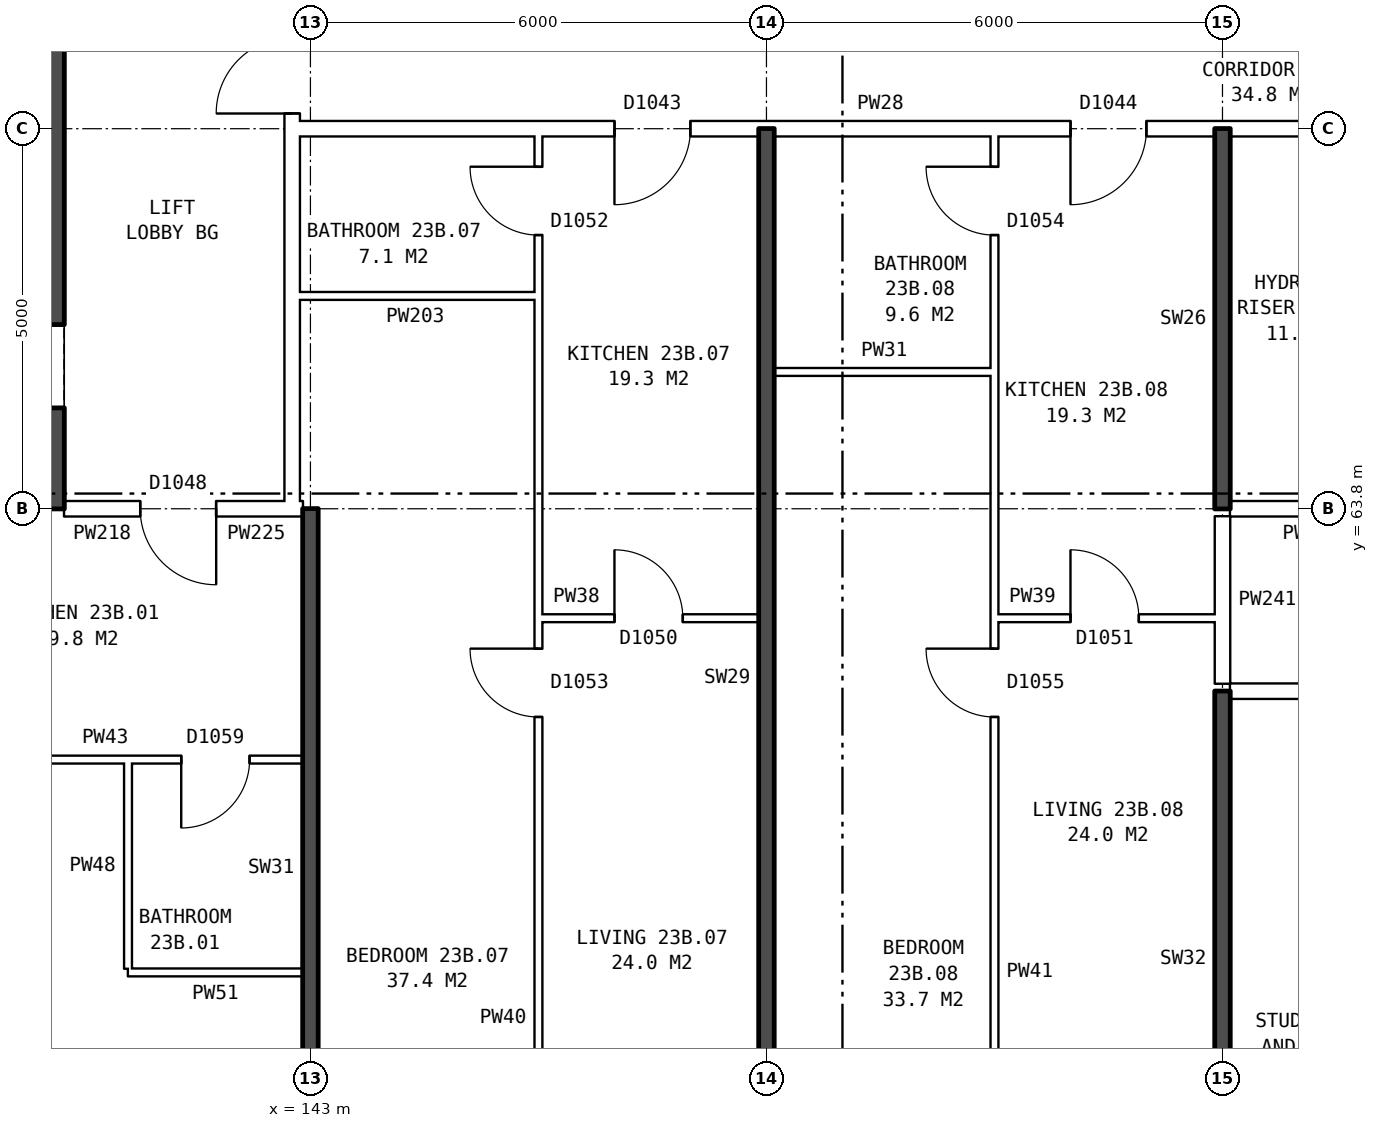
"""IFC4 building model, lengths in metres.
Left out: names, types, materials, properties, quantities, classifications, styles, units other than length and angle.
Written with IfcOpenShell. Run it as: python <this file> out.ifc"""

import sys

from ifc_helpers import new_model, si_unit, direction, frame, frame_2d, origin, place, context, subcontext, project, spatial, rectangle, extrude, element, fill, save


model = new_model("IFC4")
c1 = context("Model", 3, precision=1e-05, world=origin(), true_north=direction((0.0, 1.0)))
c2 = subcontext(c1, "Body", "Model", "MODEL_VIEW")
j1 = project(units=[si_unit("LENGTHUNIT", "METRE"), si_unit("PLANEANGLEUNIT", "RADIAN")], contexts=[c1])
p1 = place(None, origin())
s1 = spatial("IfcSite", under=j1, at=p1, CompositionType="ELEMENT")
p2 = place(p1, origin())
s2 = spatial("IfcBuilding", under=s1, at=p2, CompositionType="ELEMENT")
p3 = place(p2, frame((0.0, 0.0, 84.0)))
s3 = spatial("IfcBuildingStorey", under=s2, at=p3, CompositionType="ELEMENT", Elevation=84.0)
p4 = place(p3, frame((139.41, 64.5, 0.0), z_axis=(0.0, 0.0, 1.0), x_axis=(0.0, 1.0, 0.0)))
e1 = element("IfcWall", 1, at=p4, inside=s3, PredefinedType="SHEAR", context=c2, shape_type="SweptSolid", body=[
    extrude(rectangle(XDim=11.0, YDim=0.7, at=frame_2d((5.5, 0.0))), origin(), (0.0, 0.0, 1.0), 2.85),
])
p5 = place(p4, frame((0.625, 0.0, 0.0)))
e2 = element("IfcOpeningElement", 2, at=p5, cuts=e1, PredefinedType="OPENING", context=c2, shape_type="SweptSolid", body=[
    extrude(rectangle(XDim=1.1, YDim=2.1, at=frame_2d((0.55, 1.05))), frame((0.0, 0.36, 0.0), z_axis=(0.0, -1.0, 0.0), x_axis=(1.0, 0.0, 0.0)), (0.0, 0.0, 1.0), 0.72),
])
p6 = place(p4, frame((9.2, 0.0, 0.0)))
e3 = element("IfcOpeningElement", 3, at=p6, cuts=e1, PredefinedType="OPENING", context=c2, shape_type="SweptSolid", body=[
    extrude(rectangle(XDim=1.1, YDim=2.1, at=frame_2d((0.55, 1.05))), frame((0.0, 0.36, 0.0), z_axis=(0.0, -1.0, 0.0), x_axis=(1.0, 0.0, 0.0)), (0.0, 0.0, 1.0), 0.72),
])
p7 = place(p4, frame((7.425, 0.0, 0.0)))
e4 = element("IfcOpeningElement", 4, at=p7, cuts=e1, PredefinedType="OPENING", context=c2, shape_type="SweptSolid", body=[
    extrude(rectangle(XDim=0.85, YDim=2.1, at=frame_2d((0.425, 1.05))), frame((0.0, 0.36, 0.0), z_axis=(0.0, -1.0, 0.0), x_axis=(1.0, 0.0, 0.0)), (0.0, 0.0, 1.0), 0.72),
])
p8 = place(p3, frame((139.76, 64.15, 0.0), z_axis=(0.0, 0.0, 1.0), x_axis=(-1.0, 0.0, 0.0)))
e5 = element("IfcWall", 5, at=p8, inside=s3, PredefinedType="SHEAR", context=c2, shape_type="SweptSolid", body=[
    extrude(rectangle(XDim=8.4, YDim=0.7, at=frame_2d((4.2, 0.0))), origin(), (0.0, 0.0, 1.0), 2.85),
])
p9 = place(p3, frame((142.76, 63.9, 0.0), z_axis=(0.0, 0.0, 1.0), x_axis=(0.0, 1.0, 0.0)))
e6 = element("IfcWall", 6, at=p9, inside=s3, PredefinedType="PARTITIONING", context=c2, shape_type="SweptSolid", body=[
    extrude(rectangle(XDim=12.2, YDim=0.2, at=frame_2d((6.1, 0.0))), origin(), (0.0, 0.0, 1.0), 2.85),
])
p10 = place(p9, frame((5.1, 0.0, 0.0)))
e7 = element("IfcOpeningElement", 7, at=p10, cuts=e6, PredefinedType="OPENING", context=c2, shape_type="SweptSolid", body=[
    extrude(rectangle(XDim=2.0, YDim=2.1, at=frame_2d((1.0, 1.05))), frame((0.0, 0.11, 0.0), z_axis=(0.0, -1.0, 0.0), x_axis=(1.0, 0.0, 0.0)), (0.0, 0.0, 1.0), 0.22),
])
p11 = place(p3, frame((140.6, 57.7, 0.0), z_axis=(0.0, 0.0, 1.0), x_axis=(1.0, 0.0, 0.0)))
e8 = element("IfcWall", 8, at=p11, inside=s3, PredefinedType="PARTITIONING", context=c2, shape_type="SweptSolid", body=[
    extrude(rectangle(XDim=2.3, YDim=0.1, at=frame_2d((1.15, 0.0))), origin(), (0.0, 0.0, 1.0), 2.85),
])
p12 = place(p3, frame((137.1, 60.5, 0.0), z_axis=(0.0, 0.0, 1.0), x_axis=(1.0, 0.0, 0.0)))
e9 = element("IfcWall", 9, at=p12, inside=s3, PredefinedType="PARTITIONING", context=c2, shape_type="SweptSolid", body=[
    extrude(rectangle(XDim=5.8, YDim=0.1, at=frame_2d((2.9, 0.0))), origin(), (0.0, 0.0, 1.0), 2.85),
])
p13 = place(p12, frame((1.3, 0.0, 0.0)))
e10 = element("IfcOpeningElement", 10, at=p13, cuts=e9, PredefinedType="OPENING", context=c2, shape_type="SweptSolid", body=[
    extrude(rectangle(XDim=0.9, YDim=2.1, at=frame_2d((0.45, 1.05))), frame((0.0, 0.06, 0.0), z_axis=(0.0, -1.0, 0.0), x_axis=(1.0, 0.0, 0.0)), (0.0, 0.0, 1.0), 0.12),
])
p14 = place(p12, frame((4.2, 0.0, 0.0)))
e11 = element("IfcOpeningElement", 11, at=p14, cuts=e9, PredefinedType="OPENING", context=c2, shape_type="SweptSolid", body=[
    extrude(rectangle(XDim=0.9, YDim=2.1, at=frame_2d((0.45, 1.05))), frame((0.0, 0.06, 0.0), z_axis=(0.0, -1.0, 0.0), x_axis=(1.0, 0.0, 0.0)), (0.0, 0.0, 1.0), 0.12),
])
p15 = place(p3, frame((155.1, 61.4, 0.0), z_axis=(0.0, 0.0, 1.0), x_axis=(1.0, 0.0, 0.0)))
e12 = element("IfcWall", 12, at=p15, inside=s3, PredefinedType="PARTITIONING", context=c2, shape_type="SweptSolid", body=[
    extrude(rectangle(XDim=19.79, YDim=0.2, at=frame_2d((9.895, 0.0))), origin(), (0.0, 0.0, 1.0), 2.85),
])
p16 = place(p15, frame((1.45, 0.0, 0.0)))
e13 = element("IfcOpeningElement", 13, at=p16, cuts=e12, PredefinedType="OPENING", context=c2, shape_type="SweptSolid", body=[
    extrude(rectangle(XDim=1.0, YDim=2.1, at=frame_2d((0.5, 1.05))), frame((0.0, 0.11, 0.0), z_axis=(0.0, -1.0, 0.0), x_axis=(1.0, 0.0, 0.0)), (0.0, 0.0, 1.0), 0.22),
])
p17 = place(p15, frame((7.4, 0.0, 0.0)))
e14 = element("IfcOpeningElement", 14, at=p17, cuts=e12, PredefinedType="OPENING", context=c2, shape_type="SweptSolid", body=[
    extrude(rectangle(XDim=1.0, YDim=2.1, at=frame_2d((0.5, 1.05))), frame((0.0, 0.11, 0.0), z_axis=(0.0, -1.0, 0.0), x_axis=(1.0, 0.0, 0.0)), (0.0, 0.0, 1.0), 0.22),
])
p18 = place(p15, frame((13.2, 0.0, 0.0)))
e15 = element("IfcOpeningElement", 15, at=p18, cuts=e12, PredefinedType="OPENING", context=c2, shape_type="SweptSolid", body=[
    extrude(rectangle(XDim=1.0, YDim=2.1, at=frame_2d((0.5, 1.05))), frame((0.0, 0.11, 0.0), z_axis=(0.0, -1.0, 0.0), x_axis=(1.0, 0.0, 0.0)), (0.0, 0.0, 1.0), 0.22),
])
p19 = place(p3, frame((146.0, 62.36, 0.0), z_axis=(0.0, 0.0, 1.0), x_axis=(1.0, 0.0, 0.0)))
e16 = element("IfcWall", 16, at=p19, inside=s3, PredefinedType="PARTITIONING", context=c2, shape_type="SweptSolid", body=[
    extrude(rectangle(XDim=2.9, YDim=0.1, at=frame_2d((1.45, 0.0))), origin(), (0.0, 0.0, 1.0), 2.85),
])
p20 = place(p19, frame((1.0, 0.0, 0.0)))
e17 = element("IfcOpeningElement", 17, at=p20, cuts=e16, PredefinedType="OPENING", context=c2, shape_type="SweptSolid", body=[
    extrude(rectangle(XDim=0.9, YDim=2.1, at=frame_2d((0.45, 1.05))), frame((0.0, 0.06, 0.0), z_axis=(0.0, -1.0, 0.0), x_axis=(1.0, 0.0, 0.0)), (0.0, 0.0, 1.0), 0.12),
])
p21 = place(p3, frame((152.0, 62.36, 0.0), z_axis=(0.0, 0.0, 1.0), x_axis=(1.0, 0.0, 0.0)))
e18 = element("IfcWall", 18, at=p21, inside=s3, PredefinedType="PARTITIONING", context=c2, shape_type="SweptSolid", body=[
    extrude(rectangle(XDim=2.9, YDim=0.1, at=frame_2d((1.45, 0.0))), origin(), (0.0, 0.0, 1.0), 2.85),
])
p22 = place(p21, frame((1.0, 0.0, 0.0)))
e19 = element("IfcOpeningElement", 19, at=p22, cuts=e18, PredefinedType="OPENING", context=c2, shape_type="SweptSolid", body=[
    extrude(rectangle(XDim=0.9, YDim=2.1, at=frame_2d((0.45, 1.05))), frame((0.0, 0.06, 0.0), z_axis=(0.0, -1.0, 0.0), x_axis=(1.0, 0.0, 0.0)), (0.0, 0.0, 1.0), 0.12),
])
p23 = place(p3, frame((139.76, 63.8, 0.0), z_axis=(0.0, 0.0, 1.0), x_axis=(1.0, 0.0, 0.0)))
e20 = element("IfcWall", 20, at=p23, inside=s3, PredefinedType="PARTITIONING", context=c2, shape_type="SweptSolid", body=[
    extrude(rectangle(XDim=3.0, YDim=0.2, at=frame_2d((1.5, 0.0))), origin(), (0.0, 0.0, 1.0), 2.85),
])
p24 = place(p23, frame((1.0, 0.0, 0.0)))
e21 = element("IfcOpeningElement", 21, at=p24, cuts=e20, PredefinedType="OPENING", context=c2, shape_type="SweptSolid", body=[
    extrude(rectangle(XDim=1.0, YDim=2.1, at=frame_2d((0.5, 1.05))), frame((0.0, 0.11, 0.0), z_axis=(0.0, -1.0, 0.0), x_axis=(1.0, 0.0, 0.0)), (0.0, 0.0, 1.0), 0.22),
])
p25 = place(p3, frame((142.76, 63.8, 0.0), z_axis=(0.0, 0.0, 1.0), x_axis=(1.0, 0.0, 0.0)))
e22 = element("IfcWall", 22, at=p25, inside=s3, PredefinedType="PARTITIONING", context=c2, shape_type="SweptSolid", body=[
    extrude(rectangle(XDim=0.14, YDim=0.2, at=frame_2d((0.07, 0.0))), origin(), (0.0, 0.0, 1.0), 2.85),
])
p26 = place(p3, frame((155.1, 63.8, 0.0), z_axis=(0.0, 0.0, 1.0), x_axis=(1.0, 0.0, 0.0)))
e23 = element("IfcWall", 23, at=p26, inside=s3, PredefinedType="PARTITIONING", context=c2, shape_type="SweptSolid", body=[
    extrude(rectangle(XDim=2.14, YDim=0.2, at=frame_2d((1.07, 0.0))), origin(), (0.0, 0.0, 1.0), 2.85),
])
p27 = place(p3, frame((149.1, 65.6, 0.0), z_axis=(0.0, 0.0, 1.0), x_axis=(1.0, 0.0, 0.0)))
e24 = element("IfcWall", 24, at=p27, inside=s3, PredefinedType="PARTITIONING", context=c2, shape_type="SweptSolid", body=[
    extrude(rectangle(XDim=2.9, YDim=0.1, at=frame_2d((1.45, 0.0))), origin(), (0.0, 0.0, 1.0), 2.85),
])
p28 = place(p3, frame((142.76, 66.6, 0.0), z_axis=(0.0, 0.0, 1.0), x_axis=(1.0, 0.0, 0.0)))
e25 = element("IfcWall", 25, at=p28, inside=s3, PredefinedType="PARTITIONING", context=c2, shape_type="SweptSolid", body=[
    extrude(rectangle(XDim=3.24, YDim=0.1, at=frame_2d((1.62, 0.0))), origin(), (0.0, 0.0, 1.0), 2.85),
])
p29 = place(p3, frame((142.76, 68.8, 0.0), z_axis=(0.0, 0.0, 1.0), x_axis=(1.0, 0.0, 0.0)))
e26 = element("IfcWall", 26, at=p29, inside=s3, PredefinedType="PARTITIONING", context=c2, shape_type="SweptSolid", body=[
    extrude(rectangle(XDim=14.48, YDim=0.2, at=frame_2d((7.24, 0.0))), origin(), (0.0, 0.0, 1.0), 2.85),
])
p30 = place(p29, frame((4.24, 0.0, 0.0)))
e27 = element("IfcOpeningElement", 27, at=p30, cuts=e26, PredefinedType="OPENING", context=c2, shape_type="SweptSolid", body=[
    extrude(rectangle(XDim=1.0, YDim=2.1, at=frame_2d((0.5, 1.05))), frame((0.0, 0.11, 0.0), z_axis=(0.0, -1.0, 0.0), x_axis=(1.0, 0.0, 0.0)), (0.0, 0.0, 1.0), 0.22),
])
p31 = place(p29, frame((10.24, 0.0, 0.0)))
e28 = element("IfcOpeningElement", 28, at=p31, cuts=e26, PredefinedType="OPENING", context=c2, shape_type="SweptSolid", body=[
    extrude(rectangle(XDim=1.0, YDim=2.1, at=frame_2d((0.5, 1.05))), frame((0.0, 0.11, 0.0), z_axis=(0.0, -1.0, 0.0), x_axis=(1.0, 0.0, 0.0)), (0.0, 0.0, 1.0), 0.22),
])
p32 = place(p3, frame((140.6, 57.75, 0.0), z_axis=(0.0, 0.0, 1.0), x_axis=(0.0, 1.0, 0.0)))
e29 = element("IfcWall", 29, at=p32, inside=s3, PredefinedType="PARTITIONING", context=c2, shape_type="SweptSolid", body=[
    extrude(rectangle(XDim=2.7, YDim=0.1, at=frame_2d((1.35, 0.0))), origin(), (0.0, 0.0, 1.0), 2.85),
])
p33 = place(p3, frame((143.0, 54.36, 0.0), z_axis=(0.0, 0.0, 1.0), x_axis=(0.0, 1.0, 0.0)))
e30 = element("IfcWall", 30, at=p33, inside=s3, PredefinedType="SOLIDWALL", context=c2, shape_type="SweptSolid", body=[
    extrude(rectangle(XDim=9.44, YDim=0.2, at=frame_2d((4.72, 0.0))), origin(), (0.0, 0.0, 1.0), 2.85),
])
p34 = place(p3, frame((146.0, 54.36, 0.0), z_axis=(0.0, 0.0, 1.0), x_axis=(0.0, 1.0, 0.0)))
e31 = element("IfcWall", 31, at=p34, inside=s3, PredefinedType="PARTITIONING", context=c2, shape_type="SweptSolid", body=[
    extrude(rectangle(XDim=14.34, YDim=0.1, at=frame_2d((7.17, 0.0))), origin(), (0.0, 0.0, 1.0), 2.85),
])
p35 = place(p34, frame((6.7, 0.0, 0.0)))
e32 = element("IfcOpeningElement", 32, at=p35, cuts=e31, PredefinedType="OPENING", context=c2, shape_type="SweptSolid", body=[
    extrude(rectangle(XDim=0.9, YDim=2.1, at=frame_2d((0.45, 1.05))), frame((0.0, 0.06, 0.0), z_axis=(0.0, -1.0, 0.0), x_axis=(1.0, 0.0, 0.0)), (0.0, 0.0, 1.0), 0.12),
])
p36 = place(p34, frame((13.04, 0.0, 0.0)))
e33 = element("IfcOpeningElement", 33, at=p36, cuts=e31, PredefinedType="OPENING", context=c2, shape_type="SweptSolid", body=[
    extrude(rectangle(XDim=0.9, YDim=2.1, at=frame_2d((0.45, 1.05))), frame((0.0, 0.06, 0.0), z_axis=(0.0, -1.0, 0.0), x_axis=(1.0, 0.0, 0.0)), (0.0, 0.0, 1.0), 0.12),
])
p37 = place(p3, frame((149.0, 54.36, 0.0), z_axis=(0.0, 0.0, 1.0), x_axis=(0.0, 1.0, 0.0)))
e34 = element("IfcWall", 34, at=p37, inside=s3, PredefinedType="SOLIDWALL", context=c2, shape_type="SweptSolid", body=[
    extrude(rectangle(XDim=14.44, YDim=0.2, at=frame_2d((7.22, 0.0))), origin(), (0.0, 0.0, 1.0), 2.85),
])
p38 = place(p3, frame((152.0, 54.36, 0.0), z_axis=(0.0, 0.0, 1.0), x_axis=(0.0, 1.0, 0.0)))
e35 = element("IfcWall", 35, at=p38, inside=s3, PredefinedType="PARTITIONING", context=c2, shape_type="SweptSolid", body=[
    extrude(rectangle(XDim=14.34, YDim=0.1, at=frame_2d((7.17, 0.0))), origin(), (0.0, 0.0, 1.0), 2.85),
])
p39 = place(p38, frame((6.7, 0.0, 0.0)))
e36 = element("IfcOpeningElement", 36, at=p39, cuts=e35, PredefinedType="OPENING", context=c2, shape_type="SweptSolid", body=[
    extrude(rectangle(XDim=0.9, YDim=2.1, at=frame_2d((0.45, 1.05))), frame((0.0, 0.06, 0.0), z_axis=(0.0, -1.0, 0.0), x_axis=(1.0, 0.0, 0.0)), (0.0, 0.0, 1.0), 0.12),
])
p40 = place(p38, frame((13.04, 0.0, 0.0)))
e37 = element("IfcOpeningElement", 37, at=p40, cuts=e35, PredefinedType="OPENING", context=c2, shape_type="SweptSolid", body=[
    extrude(rectangle(XDim=0.9, YDim=2.1, at=frame_2d((0.45, 1.05))), frame((0.0, 0.06, 0.0), z_axis=(0.0, -1.0, 0.0), x_axis=(1.0, 0.0, 0.0)), (0.0, 0.0, 1.0), 0.12),
])
p41 = place(p3, frame((155.0, 54.36, 0.0), z_axis=(0.0, 0.0, 1.0), x_axis=(0.0, 1.0, 0.0)))
e38 = element("IfcWall", 38, at=p41, inside=s3, PredefinedType="SOLIDWALL", context=c2, shape_type="SweptSolid", body=[
    extrude(rectangle(XDim=7.04, YDim=0.2, at=frame_2d((3.52, 0.0))), origin(), (0.0, 0.0, 1.0), 2.85),
])
p42 = place(p3, frame((155.0, 61.5, 0.0), z_axis=(0.0, 0.0, 1.0), x_axis=(0.0, 1.0, 0.0)))
e39 = element("IfcWall", 39, at=p42, inside=s3, PredefinedType="PARTITIONING", context=c2, shape_type="SweptSolid", body=[
    extrude(rectangle(XDim=2.2, YDim=0.2, at=frame_2d((1.1, 0.0))), origin(), (0.0, 0.0, 1.0), 2.85),
])
p43 = place(p3, frame((155.0, 63.8, 0.0), z_axis=(0.0, 0.0, 1.0), x_axis=(0.0, 1.0, 0.0)))
e40 = element("IfcWall", 40, at=p43, inside=s3, PredefinedType="SOLIDWALL", context=c2, shape_type="SweptSolid", body=[
    extrude(rectangle(XDim=5.0, YDim=0.2, at=frame_2d((2.5, 0.0))), origin(), (0.0, 0.0, 1.0), 2.85),
])
p44 = place(p10, origin())
e41 = element("IfcDoor", 41, at=p44, inside=s3, OperationType="DOUBLE_DOOR_SINGLE_SWING", PredefinedType="DOOR", context=c2, shape_type="SweptSolid", body=[
    extrude(rectangle(XDim=2.0, YDim=2.1, at=frame_2d((1.0, 1.05))), frame((0.0, 0.025, 0.0), z_axis=(0.0, -1.0, 0.0), x_axis=(1.0, 0.0, 0.0)), (0.0, 0.0, 1.0), 0.05),
])
fill(e7, e41)
p45 = place(p24, frame((1.0, 0.0, 0.0), z_axis=(0.0, 0.0, 1.0), x_axis=(-1.0, 0.0, 0.0)))
e42 = element("IfcDoor", 42, at=p45, inside=s3, OperationType="SINGLE_SWING_LEFT", PredefinedType="DOOR", context=c2, shape_type="SweptSolid", body=[
    extrude(rectangle(XDim=1.0, YDim=2.1, at=frame_2d((0.5, 1.05))), frame((0.0, 0.025, 0.0), z_axis=(0.0, -1.0, 0.0), x_axis=(1.0, 0.0, 0.0)), (0.0, 0.0, 1.0), 0.05),
])
fill(e21, e42)
p46 = place(p14, frame((0.9, 0.0, 0.0), z_axis=(0.0, 0.0, 1.0), x_axis=(-1.0, 0.0, 0.0)))
e43 = element("IfcDoor", 43, at=p46, inside=s3, OperationType="SINGLE_SWING_RIGHT", PredefinedType="DOOR", context=c2, shape_type="SweptSolid", body=[
    extrude(rectangle(XDim=0.9, YDim=2.1, at=frame_2d((0.45, 1.05))), frame((0.0, 0.025, 0.0), z_axis=(0.0, -1.0, 0.0), x_axis=(1.0, 0.0, 0.0)), (0.0, 0.0, 1.0), 0.05),
])
fill(e11, e43)
p47 = place(p35, origin())
e44 = element("IfcDoor", 44, at=p47, inside=s3, OperationType="SINGLE_SWING_RIGHT", PredefinedType="DOOR", context=c2, shape_type="SweptSolid", body=[
    extrude(rectangle(XDim=0.9, YDim=2.1, at=frame_2d((0.45, 1.05))), frame((0.0, 0.025, 0.0), z_axis=(0.0, -1.0, 0.0), x_axis=(1.0, 0.0, 0.0)), (0.0, 0.0, 1.0), 0.05),
])
fill(e32, e44)
p48 = place(p30, frame((1.0, 0.0, 0.0), z_axis=(0.0, 0.0, 1.0), x_axis=(-1.0, 0.0, 0.0)))
e45 = element("IfcDoor", 45, at=p48, inside=s3, OperationType="SINGLE_SWING_RIGHT", PredefinedType="DOOR", context=c2, shape_type="SweptSolid", body=[
    extrude(rectangle(XDim=1.0, YDim=2.1, at=frame_2d((0.5, 1.05))), frame((0.0, 0.025, 0.0), z_axis=(0.0, -1.0, 0.0), x_axis=(1.0, 0.0, 0.0)), (0.0, 0.0, 1.0), 0.05),
])
fill(e27, e45)
p49 = place(p20, origin())
e46 = element("IfcDoor", 46, at=p49, inside=s3, OperationType="SINGLE_SWING_LEFT", PredefinedType="DOOR", context=c2, shape_type="SweptSolid", body=[
    extrude(rectangle(XDim=0.9, YDim=2.1, at=frame_2d((0.45, 1.05))), frame((0.0, 0.025, 0.0), z_axis=(0.0, -1.0, 0.0), x_axis=(1.0, 0.0, 0.0)), (0.0, 0.0, 1.0), 0.05),
])
fill(e17, e46)
p50 = place(p36, origin())
e47 = element("IfcDoor", 47, at=p50, inside=s3, OperationType="SINGLE_SWING_RIGHT", PredefinedType="DOOR", context=c2, shape_type="SweptSolid", body=[
    extrude(rectangle(XDim=0.9, YDim=2.1, at=frame_2d((0.45, 1.05))), frame((0.0, 0.025, 0.0), z_axis=(0.0, -1.0, 0.0), x_axis=(1.0, 0.0, 0.0)), (0.0, 0.0, 1.0), 0.05),
])
fill(e33, e47)
p51 = place(p39, origin())
e48 = element("IfcDoor", 48, at=p51, inside=s3, OperationType="SINGLE_SWING_RIGHT", PredefinedType="DOOR", context=c2, shape_type="SweptSolid", body=[
    extrude(rectangle(XDim=0.9, YDim=2.1, at=frame_2d((0.45, 1.05))), frame((0.0, 0.025, 0.0), z_axis=(0.0, -1.0, 0.0), x_axis=(1.0, 0.0, 0.0)), (0.0, 0.0, 1.0), 0.05),
])
fill(e36, e48)
p52 = place(p31, frame((1.0, 0.0, 0.0), z_axis=(0.0, 0.0, 1.0), x_axis=(-1.0, 0.0, 0.0)))
e49 = element("IfcDoor", 49, at=p52, inside=s3, OperationType="SINGLE_SWING_RIGHT", PredefinedType="DOOR", context=c2, shape_type="SweptSolid", body=[
    extrude(rectangle(XDim=1.0, YDim=2.1, at=frame_2d((0.5, 1.05))), frame((0.0, 0.025, 0.0), z_axis=(0.0, -1.0, 0.0), x_axis=(1.0, 0.0, 0.0)), (0.0, 0.0, 1.0), 0.05),
])
fill(e28, e49)
p53 = place(p22, origin())
e50 = element("IfcDoor", 50, at=p53, inside=s3, OperationType="SINGLE_SWING_LEFT", PredefinedType="DOOR", context=c2, shape_type="SweptSolid", body=[
    extrude(rectangle(XDim=0.9, YDim=2.1, at=frame_2d((0.45, 1.05))), frame((0.0, 0.025, 0.0), z_axis=(0.0, -1.0, 0.0), x_axis=(1.0, 0.0, 0.0)), (0.0, 0.0, 1.0), 0.05),
])
fill(e19, e50)
p54 = place(p40, origin())
e51 = element("IfcDoor", 51, at=p54, inside=s3, OperationType="SINGLE_SWING_RIGHT", PredefinedType="DOOR", context=c2, shape_type="SweptSolid", body=[
    extrude(rectangle(XDim=0.9, YDim=2.1, at=frame_2d((0.45, 1.05))), frame((0.0, 0.025, 0.0), z_axis=(0.0, -1.0, 0.0), x_axis=(1.0, 0.0, 0.0)), (0.0, 0.0, 1.0), 0.05),
])
fill(e37, e51)
save(model, sys.argv[1])
